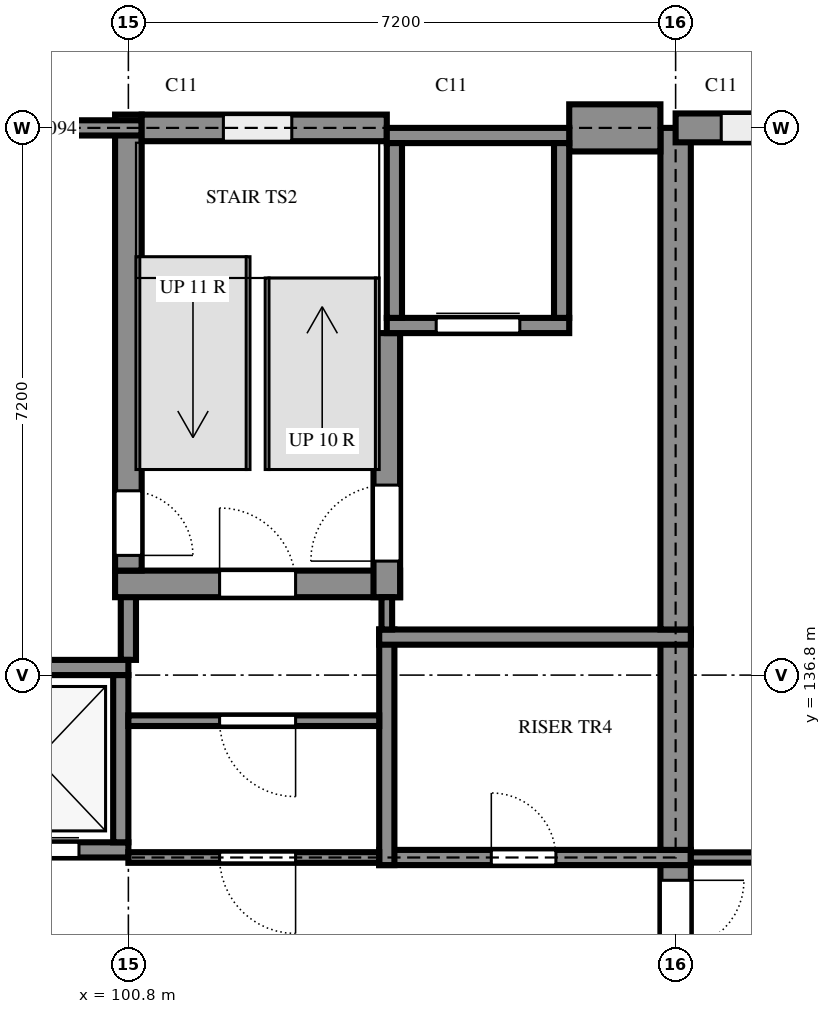
"""IFC4 building model, lengths in metres.
Left out: names, types, materials, properties, quantities, classifications, styles, units other than length and angle.
Written with IfcOpenShell. Run it as: python <this file> out.ifc"""

import sys

from ifc_helpers import new_model, si_unit, direction, frame, frame_2d, origin, origin_2d, place, context, subcontext, project, spatial, rectangle, i_section, extrude, element, fill, save


model = new_model("IFC4")
c1 = context("Model", 3, precision=1e-05, world=origin(), true_north=direction((0.0, 1.0)))
c2 = subcontext(c1, "Body", "Model", "MODEL_VIEW")
j1 = project(units=[si_unit("LENGTHUNIT", "METRE"), si_unit("PLANEANGLEUNIT", "RADIAN")], contexts=[c1])
p1 = place(None, origin())
s1 = spatial("IfcSite", under=j1, at=p1, CompositionType="ELEMENT")
p2 = place(p1, origin())
s2 = spatial("IfcBuilding", under=s1, at=p2, CompositionType="ELEMENT")
p3 = place(p2, frame((0.0, 0.0, 7.2)))
s3 = spatial("IfcBuildingStorey", under=s2, at=p3, CompositionType="ELEMENT", Elevation=7.2)
p4 = place(p3, frame((108.0, 132.0, 0.0), z_axis=(0.0, 0.0, 1.0), x_axis=(0.0, 1.0, 0.0)))
e1 = element("IfcWall", 1, at=p4, inside=s3, PredefinedType="SHEAR", context=c2, shape_type="SweptSolid", body=[
    extrude(rectangle(XDim=2.5, YDim=0.4, at=frame_2d((1.25, 0.0))), origin(), (0.0, 0.0, 1.0), 3.6),
])
p5 = place(p4, frame((0.3, 0.0, 0.0)))
e2 = element("IfcOpeningElement", 2, at=p5, cuts=e1, PredefinedType="OPENING", context=c2, shape_type="SweptSolid", body=[
    extrude(rectangle(XDim=1.8, YDim=2.1, at=frame_2d((0.9, 1.05))), frame((0.0, 0.21, 0.0), z_axis=(0.0, -1.0, 0.0), x_axis=(1.0, 0.0, 0.0)), (0.0, 0.0, 1.0), 0.42),
])
p6 = place(p3, frame((104.1, 134.4, 0.0), z_axis=(0.0, 0.0, 1.0), x_axis=(1.0, 0.0, 0.0)))
e3 = element("IfcWall", 3, at=p6, inside=s3, PredefinedType="SHEAR", context=c2, shape_type="SweptSolid", body=[
    extrude(rectangle(XDim=4.1, YDim=0.2, at=frame_2d((2.05, 0.0))), origin(), (0.0, 0.0, 1.0), 3.6),
])
p7 = place(p6, frame((1.475, 0.0, 0.0)))
e4 = element("IfcOpeningElement", 4, at=p7, cuts=e3, PredefinedType="OPENING", context=c2, shape_type="SweptSolid", body=[
    extrude(rectangle(XDim=0.85, YDim=2.1, at=frame_2d((0.425, 1.05))), frame((0.0, 0.11, 0.0), z_axis=(0.0, -1.0, 0.0), x_axis=(1.0, 0.0, 0.0)), (0.0, 0.0, 1.0), 0.22),
])
p8 = place(p3, frame((108.0, 134.5, 0.0), z_axis=(0.0, 0.0, 1.0), x_axis=(0.0, 1.0, 0.0)))
e5 = element("IfcWall", 5, at=p8, inside=s3, PredefinedType="SHEAR", context=c2, shape_type="SweptSolid", body=[
    extrude(rectangle(XDim=2.9, YDim=0.4, at=frame_2d((1.45, 0.0))), origin(), (0.0, 0.0, 1.0), 3.6),
])
p9 = place(p3, frame((100.8, 137.0, 0.0), z_axis=(0.0, 0.0, 1.0), x_axis=(0.0, 1.0, 0.0)))
e6 = element("IfcWall", 6, at=p9, inside=s3, PredefinedType="SHEAR", context=c2, shape_type="SweptSolid", body=[
    extrude(rectangle(XDim=1.175, YDim=0.2, at=frame_2d((0.587, 0.0))), origin(), (0.0, 0.0, 1.0), 3.6),
])
p10 = place(p3, frame((104.2, 137.4, 0.0), z_axis=(0.0, 0.0, 1.0), x_axis=(0.0, -1.0, 0.0)))
e7 = element("IfcWall", 7, at=p10, inside=s3, PredefinedType="SHEAR", context=c2, shape_type="SweptSolid", body=[
    extrude(rectangle(XDim=3.1, YDim=0.2, at=frame_2d((1.55, 0.0))), origin(), (0.0, 0.0, 1.0), 3.6),
])
p11 = place(p3, frame((108.2, 137.3, 0.0), z_axis=(0.0, 0.0, 1.0), x_axis=(-1.0, 0.0, 0.0)))
e8 = element("IfcWall", 8, at=p11, inside=s3, PredefinedType="SHEAR", context=c2, shape_type="SweptSolid", body=[
    extrude(rectangle(XDim=4.1, YDim=0.2, at=frame_2d((2.05, 0.0))), origin(), (0.0, 0.0, 1.0), 3.6),
])
p12 = place(p3, frame((108.0, 137.4, 0.0), z_axis=(0.0, 0.0, 1.0), x_axis=(0.0, 1.0, 0.0)))
e9 = element("IfcWall", 9, at=p12, inside=s3, PredefinedType="SHEAR", context=c2, shape_type="SweptSolid", body=[
    extrude(rectangle(XDim=6.6, YDim=0.4, at=frame_2d((3.3, 0.0))), origin(), (0.0, 0.0, 1.0), 3.6),
])
p13 = place(p3, frame((100.625, 138.0, 0.0), z_axis=(0.0, 0.0, 1.0), x_axis=(1.0, 0.0, 0.0)))
e10 = element("IfcWall", 10, at=p13, inside=s3, PredefinedType="SHEAR", context=c2, shape_type="SweptSolid", body=[
    extrude(rectangle(XDim=3.75, YDim=0.35, at=frame_2d((1.875, 0.0))), origin(), (0.0, 0.0, 1.0), 3.6),
])
p14 = place(p13, frame((1.375, 0.0, 0.0)))
e11 = element("IfcOpeningElement", 11, at=p14, cuts=e10, PredefinedType="OPENING", context=c2, shape_type="SweptSolid", body=[
    extrude(rectangle(XDim=1.0, YDim=2.1, at=frame_2d((0.5, 1.05))), frame((0.0, 0.185, 0.0), z_axis=(0.0, -1.0, 0.0), x_axis=(1.0, 0.0, 0.0)), (0.0, 0.0, 1.0), 0.37),
])
p15 = place(p3, frame((104.2, 137.825, 0.0), z_axis=(0.0, 0.0, 1.0), x_axis=(0.0, 1.0, 0.0)))
e12 = element("IfcWall", 12, at=p15, inside=s3, PredefinedType="SHEAR", context=c2, shape_type="SweptSolid", body=[
    extrude(rectangle(XDim=3.475, YDim=0.35, at=frame_2d((1.738, 0.0))), origin(), (0.0, 0.0, 1.0), 3.6),
])
p16 = place(p15, frame((0.475, 0.0, 0.0)))
e13 = element("IfcOpeningElement", 13, at=p16, cuts=e12, PredefinedType="OPENING", context=c2, shape_type="SweptSolid", body=[
    extrude(rectangle(XDim=1.0, YDim=2.1, at=frame_2d((0.5, 1.05))), frame((0.0, 0.185, 0.0), z_axis=(0.0, -1.0, 0.0), x_axis=(1.0, 0.0, 0.0)), (0.0, 0.0, 1.0), 0.37),
])
p17 = place(p3, frame((100.8, 144.175, 0.0), z_axis=(0.0, 0.0, 1.0), x_axis=(0.0, -1.0, 0.0)))
e14 = element("IfcWall", 14, at=p17, inside=s3, PredefinedType="SHEAR", context=c2, shape_type="SweptSolid", body=[
    extrude(rectangle(XDim=6.0, YDim=0.35, at=frame_2d((3.0, 0.0))), origin(), (0.0, 0.0, 1.0), 3.6),
])
p18 = place(p17, frame((4.95, 0.0, 0.0)))
e15 = element("IfcOpeningElement", 15, at=p18, cuts=e14, PredefinedType="OPENING", context=c2, shape_type="SweptSolid", body=[
    extrude(rectangle(XDim=0.85, YDim=2.1, at=frame_2d((0.425, 1.05))), frame((0.0, 0.185, 0.0), z_axis=(0.0, -1.0, 0.0), x_axis=(1.0, 0.0, 0.0)), (0.0, 0.0, 1.0), 0.37),
])
p19 = place(p3, frame((100.975, 144.0, 0.0), z_axis=(0.0, 0.0, 1.0), x_axis=(-1.0, 0.0, 0.0)))
e16 = element("IfcWall", 16, at=p19, inside=s3, PredefinedType="SHEAR", context=c2, shape_type="SweptSolid", body=[
    extrude(rectangle(XDim=7.575, YDim=0.2, at=frame_2d((3.788, 0.0))), origin(), (0.0, 0.0, 1.0), 3.6),
])
p20 = place(p3, frame((104.2, 144.0, 0.0), z_axis=(0.0, 0.0, 1.0), x_axis=(-1.0, 0.0, 0.0)))
e17 = element("IfcWall", 17, at=p20, inside=s3, PredefinedType="SHEAR", context=c2, shape_type="SweptSolid", body=[
    extrude(rectangle(XDim=3.225, YDim=0.35, at=frame_2d((1.612, 0.0))), origin(), (0.0, 0.0, 1.0), 3.6),
])
p21 = place(p20, frame((1.25, 0.0, 0.6)))
e18 = element("IfcOpeningElement", 18, at=p21, cuts=e17, PredefinedType="OPENING", context=c2, shape_type="SweptSolid", body=[
    extrude(rectangle(XDim=0.9, YDim=2.1, at=frame_2d((0.45, 1.05))), frame((0.0, 0.185, 0.0), z_axis=(0.0, -1.0, 0.0), x_axis=(1.0, 0.0, 0.0)), (0.0, 0.0, 1.0), 0.37),
])
p22 = place(p3, frame((115.046, 144.0, 0.0), z_axis=(0.0, 0.0, 1.0), x_axis=(-1.0, 0.0, 0.0)))
e19 = element("IfcWall", 19, at=p22, inside=s3, PredefinedType="SOLIDWALL", context=c2, shape_type="SweptSolid", body=[
    extrude(rectangle(XDim=7.046, YDim=0.38, at=frame_2d((3.523, 0.0))), origin(), (0.0, 0.0, 1.0), 3.12),
])
p23 = place(p22, frame((4.046, 0.0, 0.6)))
e20 = element("IfcOpeningElement", 20, at=p23, cuts=e19, PredefinedType="OPENING", context=c2, shape_type="SweptSolid", body=[
    extrude(rectangle(XDim=2.4, YDim=2.4, at=frame_2d((1.2, 1.2))), frame((0.0, 0.2, 0.0), z_axis=(0.0, -1.0, 0.0), x_axis=(1.0, 0.0, 0.0)), (0.0, 0.0, 1.0), 0.4),
])
p24 = place(p22, frame((0.447, 0.0, 0.6)))
e21 = element("IfcOpeningElement", 21, at=p24, cuts=e19, PredefinedType="OPENING", context=c2, shape_type="SweptSolid", body=[
    extrude(rectangle(XDim=2.4, YDim=2.4, at=frame_2d((1.2, 1.2))), frame((0.0, 0.2, 0.0), z_axis=(0.0, -1.0, 0.0), x_axis=(1.0, 0.0, 0.0)), (0.0, 0.0, 1.0), 0.4),
])
p25 = place(p3, frame((107.8, 144.0, 0.0), z_axis=(0.0, 0.0, 1.0), x_axis=(-1.0, 0.0, 0.0)))
e22 = element("IfcWall", 22, at=p25, inside=s3, PredefinedType="SOLIDWALL", context=c2, shape_type="SweptSolid", body=[
    extrude(rectangle(XDim=1.2, YDim=0.62, at=frame_2d((0.6, 0.0))), origin(), (0.0, 0.0, 1.0), 3.42),
])
p26 = place(p3, frame((98.4, 134.5, 0.0), z_axis=(0.0, 0.0, 1.0), x_axis=(1.0, 0.0, 0.0)))
e23 = element("IfcWall", 23, at=p26, inside=s3, PredefinedType="SHEAR", context=c2, shape_type="SweptSolid", body=[
    extrude(rectangle(XDim=2.4, YDim=0.2, at=frame_2d((1.2, 0.0))), origin(), (0.0, 0.0, 1.0), 3.6),
])
p27 = place(p26, frame((0.65, 0.0, 0.0)))
e24 = element("IfcOpeningElement", 24, at=p27, cuts=e23, PredefinedType="OPENING", context=c2, shape_type="SweptSolid", body=[
    extrude(rectangle(XDim=1.1, YDim=2.1, at=frame_2d((0.55, 1.05))), frame((0.0, 0.11, 0.0), z_axis=(0.0, -1.0, 0.0), x_axis=(1.0, 0.0, 0.0)), (0.0, 0.0, 1.0), 0.22),
])
p28 = place(p3, frame((98.4, 136.9, 0.0), z_axis=(0.0, 0.0, 1.0), x_axis=(1.0, 0.0, 0.0)))
e25 = element("IfcWall", 25, at=p28, inside=s3, PredefinedType="SHEAR", context=c2, shape_type="SweptSolid", body=[
    extrude(rectangle(XDim=2.4, YDim=0.2, at=frame_2d((1.2, 0.0))), origin(), (0.0, 0.0, 1.0), 3.6),
])
p29 = place(p3, frame((100.7, 134.6, 0.0), z_axis=(0.0, 0.0, 1.0), x_axis=(0.0, 1.0, 0.0)))
e26 = element("IfcWall", 26, at=p29, inside=s3, PredefinedType="SHEAR", context=c2, shape_type="SweptSolid", body=[
    extrude(rectangle(XDim=2.2, YDim=0.2, at=frame_2d((1.1, 0.0))), origin(), (0.0, 0.0, 1.0), 3.6),
])
p30 = place(p3, frame((104.2, 141.4, 0.0), z_axis=(0.0, 0.0, 1.0), x_axis=(1.0, 0.0, 0.0)))
e27 = element("IfcWall", 27, at=p30, inside=s3, PredefinedType="SHEAR", context=c2, shape_type="SweptSolid", body=[
    extrude(rectangle(XDim=2.4, YDim=0.2, at=frame_2d((1.2, 0.0))), origin(), (0.0, 0.0, 1.0), 3.6),
])
p31 = place(p30, frame((0.65, 0.0, 0.0)))
e28 = element("IfcOpeningElement", 28, at=p31, cuts=e27, PredefinedType="OPENING", context=c2, shape_type="SweptSolid", body=[
    extrude(rectangle(XDim=1.1, YDim=2.1, at=frame_2d((0.55, 1.05))), frame((0.0, 0.11, 0.0), z_axis=(0.0, -1.0, 0.0), x_axis=(1.0, 0.0, 0.0)), (0.0, 0.0, 1.0), 0.22),
])
p32 = place(p3, frame((104.2, 143.9, 0.0), z_axis=(0.0, 0.0, 1.0), x_axis=(1.0, 0.0, 0.0)))
e29 = element("IfcWall", 29, at=p32, inside=s3, PredefinedType="SHEAR", context=c2, shape_type="SweptSolid", body=[
    extrude(rectangle(XDim=2.4, YDim=0.2, at=frame_2d((1.2, 0.0))), origin(), (0.0, 0.0, 1.0), 3.6),
])
for number, where, z_axis, x_axis in (
    (30, (104.3, 141.5, 0.0), (0.0, 0.0, 1.0), (0.0, 1.0, 0.0)),
    (31, (106.5, 141.5, 0.0), (0.0, 0.0, 1.0), (0.0, 1.0, 0.0)),
):
    element("IfcWall", number, at=place(p3, frame(where, z_axis=z_axis, x_axis=x_axis)), inside=s3, PredefinedType="SHEAR", context=c2, shape_type="SweptSolid", body=[
        extrude(rectangle(XDim=2.3, YDim=0.2, at=frame_2d((1.15, 0.0))), origin(), (0.0, 0.0, 1.0), 3.6),
    ])
for number, where, z_axis, x_axis in (
    (32, (101.5, 144.55, 0.0), (0.0, 0.0, 1.0), (1.0, 0.0, 0.0)),
    (33, (105.05, 144.55, 0.0), (0.0, 0.0, 1.0), (1.0, 0.0, 0.0)),
    (34, (108.6, 144.55, 0.0), (0.0, 0.0, 1.0), (1.0, 0.0, 0.0)),
):
    element("IfcColumn", number, at=place(p3, frame(where, z_axis=z_axis, x_axis=x_axis)), inside=s3, PredefinedType="COLUMN", context=c2, shape_type="SweptSolid", body=[
        extrude(i_section(OverallWidth=0.2, OverallDepth=0.2, WebThickness=0.009, FlangeThickness=0.015, FilletRadius=0.018, at=origin_2d()), origin(), (0.0, 0.0, 1.0), 3.6),
    ])
p33 = place(p3, frame((100.8, 134.4, 0.0), z_axis=(0.0, 0.0, 1.0), x_axis=(1.0, 0.0, 0.0)))
e35 = element("IfcWall", 35, at=p33, inside=s3, PredefinedType="PARTITIONING", context=c2, shape_type="SweptSolid", body=[
    extrude(rectangle(XDim=3.3, YDim=0.14, at=frame_2d((1.65, 0.0))), origin(), (0.0, 0.0, 1.0), 3.42),
])
p34 = place(p33, frame((1.2, 0.0, 0.0)))
e36 = element("IfcOpeningElement", 36, at=p34, cuts=e35, PredefinedType="OPENING", context=c2, shape_type="SweptSolid", body=[
    extrude(rectangle(XDim=1.0, YDim=2.1, at=frame_2d((0.5, 1.05))), frame((0.0, 0.08, 0.0), z_axis=(0.0, -1.0, 0.0), x_axis=(1.0, 0.0, 0.0)), (0.0, 0.0, 1.0), 0.16),
])
p35 = place(p3, frame((108.2, 134.4, 0.0), z_axis=(0.0, 0.0, 1.0), x_axis=(1.0, 0.0, 0.0)))
e37 = element("IfcWall", 37, at=p35, inside=s3, PredefinedType="PARTITIONING", context=c2, shape_type="SweptSolid", body=[
    extrude(rectangle(XDim=25.07, YDim=0.135, at=frame_2d((12.535, 0.0))), origin(), (0.0, 0.0, 1.0), 3.12),
])
p36 = place(p35, frame((9.7, 0.0, 0.0)))
e38 = element("IfcOpeningElement", 38, at=p36, cuts=e37, PredefinedType="OPENING", context=c2, shape_type="SweptSolid", body=[
    extrude(rectangle(XDim=1.8, YDim=2.1, at=frame_2d((0.9, 1.05))), frame((0.0, 0.077, 0.0), z_axis=(0.0, -1.0, 0.0), x_axis=(1.0, 0.0, 0.0)), (0.0, 0.0, 1.0), 0.155),
])
p37 = place(p35, frame((16.9, 0.0, 0.0)))
e39 = element("IfcOpeningElement", 39, at=p37, cuts=e37, PredefinedType="OPENING", context=c2, shape_type="SweptSolid", body=[
    extrude(rectangle(XDim=1.8, YDim=2.1, at=frame_2d((0.9, 1.05))), frame((0.0, 0.077, 0.0), z_axis=(0.0, -1.0, 0.0), x_axis=(1.0, 0.0, 0.0)), (0.0, 0.0, 1.0), 0.155),
])
p38 = place(p3, frame((100.8, 136.2, 0.0), z_axis=(0.0, 0.0, 1.0), x_axis=(1.0, 0.0, 0.0)))
e40 = element("IfcWall", 40, at=p38, inside=s3, PredefinedType="PARTITIONING", context=c2, shape_type="SweptSolid", body=[
    extrude(rectangle(XDim=3.3, YDim=0.14, at=frame_2d((1.65, 0.0))), origin(), (0.0, 0.0, 1.0), 3.42),
])
p39 = place(p38, frame((1.2, 0.0, 0.0)))
e41 = element("IfcOpeningElement", 41, at=p39, cuts=e40, PredefinedType="OPENING", context=c2, shape_type="SweptSolid", body=[
    extrude(rectangle(XDim=1.0, YDim=2.1, at=frame_2d((0.5, 1.05))), frame((0.0, 0.08, 0.0), z_axis=(0.0, -1.0, 0.0), x_axis=(1.0, 0.0, 0.0)), (0.0, 0.0, 1.0), 0.16),
])
p40 = place(p3, frame((104.2, 137.4, 0.0), z_axis=(0.0, 0.0, 1.0), x_axis=(0.0, 1.0, 0.0)))
e42 = element("IfcWall", 42, at=p40, inside=s3, PredefinedType="PARTITIONING", context=c2, shape_type="SweptSolid", body=[
    extrude(rectangle(XDim=0.425, YDim=0.14, at=frame_2d((0.212, 0.0))), origin(), (0.0, 0.0, 1.0), 3.42),
])
p41 = place(p23, origin())
e43 = element("IfcWindow", 43, at=p41, inside=s3, PartitioningType="SINGLE_PANEL", PredefinedType="WINDOW", context=c2, shape_type="SweptSolid", body=[
    extrude(rectangle(XDim=2.4, YDim=2.4, at=frame_2d((1.2, 1.2))), frame((0.0, 0.03, 0.0), z_axis=(0.0, -1.0, 0.0), x_axis=(1.0, 0.0, 0.0)), (0.0, 0.0, 1.0), 0.06),
])
fill(e20, e43)
p42 = place(p21, origin())
e44 = element("IfcWindow", 44, at=p42, inside=s3, PartitioningType="SINGLE_PANEL", PredefinedType="WINDOW", context=c2, shape_type="SweptSolid", body=[
    extrude(rectangle(XDim=0.9, YDim=2.1, at=frame_2d((0.45, 1.05))), frame((0.0, 0.03, 0.0), z_axis=(0.0, -1.0, 0.0), x_axis=(1.0, 0.0, 0.0)), (0.0, 0.0, 1.0), 0.06),
])
fill(e18, e44)
p43 = place(p27, origin())
e45 = element("IfcDoor", 45, at=p43, inside=s3, OperationType="SLIDING_TO_LEFT", PredefinedType="DOOR", context=c2, shape_type="SweptSolid", body=[
    extrude(rectangle(XDim=1.1, YDim=2.1, at=frame_2d((0.55, 1.05))), frame((0.0, 0.025, 0.0), z_axis=(0.0, -1.0, 0.0), x_axis=(1.0, 0.0, 0.0)), (0.0, 0.0, 1.0), 0.05),
])
fill(e24, e45)
p44 = place(p31, origin())
e46 = element("IfcDoor", 46, at=p44, inside=s3, OperationType="SLIDING_TO_LEFT", PredefinedType="DOOR", context=c2, shape_type="SweptSolid", body=[
    extrude(rectangle(XDim=1.1, YDim=2.1, at=frame_2d((0.55, 1.05))), frame((0.0, 0.025, 0.0), z_axis=(0.0, -1.0, 0.0), x_axis=(1.0, 0.0, 0.0)), (0.0, 0.0, 1.0), 0.05),
])
fill(e28, e46)
p45 = place(p34, frame((1.0, 0.0, 0.0), z_axis=(0.0, 0.0, 1.0), x_axis=(-1.0, 0.0, 0.0)))
e47 = element("IfcDoor", 47, at=p45, inside=s3, OperationType="SINGLE_SWING_RIGHT", PredefinedType="DOOR", context=c2, shape_type="SweptSolid", body=[
    extrude(rectangle(XDim=1.0, YDim=2.1, at=frame_2d((0.5, 1.05))), frame((0.0, 0.025, 0.0), z_axis=(0.0, -1.0, 0.0), x_axis=(1.0, 0.0, 0.0)), (0.0, 0.0, 1.0), 0.05),
])
fill(e36, e47)
p46 = place(p39, frame((1.0, 0.0, 0.0), z_axis=(0.0, 0.0, 1.0), x_axis=(-1.0, 0.0, 0.0)))
e48 = element("IfcDoor", 48, at=p46, inside=s3, OperationType="SINGLE_SWING_RIGHT", PredefinedType="DOOR", context=c2, shape_type="SweptSolid", body=[
    extrude(rectangle(XDim=1.0, YDim=2.1, at=frame_2d((0.5, 1.05))), frame((0.0, 0.025, 0.0), z_axis=(0.0, -1.0, 0.0), x_axis=(1.0, 0.0, 0.0)), (0.0, 0.0, 1.0), 0.05),
])
fill(e41, e48)
p47 = place(p7, origin())
e49 = element("IfcDoor", 49, at=p47, inside=s3, OperationType="SINGLE_SWING_RIGHT", PredefinedType="DOOR", context=c2, shape_type="SweptSolid", body=[
    extrude(rectangle(XDim=0.85, YDim=2.1, at=frame_2d((0.425, 1.05))), frame((0.0, 0.025, 0.0), z_axis=(0.0, -1.0, 0.0), x_axis=(1.0, 0.0, 0.0)), (0.0, 0.0, 1.0), 0.05),
])
fill(e4, e49)
p48 = place(p14, origin())
e50 = element("IfcDoor", 50, at=p48, inside=s3, OperationType="SINGLE_SWING_RIGHT", PredefinedType="DOOR", context=c2, shape_type="SweptSolid", body=[
    extrude(rectangle(XDim=1.0, YDim=2.1, at=frame_2d((0.5, 1.05))), frame((0.0, 0.025, 0.0), z_axis=(0.0, -1.0, 0.0), x_axis=(1.0, 0.0, 0.0)), (0.0, 0.0, 1.0), 0.05),
])
fill(e11, e50)
p49 = place(p18, origin())
e51 = element("IfcDoor", 51, at=p49, inside=s3, OperationType="SINGLE_SWING_LEFT", PredefinedType="DOOR", context=c2, shape_type="SweptSolid", body=[
    extrude(rectangle(XDim=0.85, YDim=2.1, at=frame_2d((0.425, 1.05))), frame((0.0, 0.025, 0.0), z_axis=(0.0, -1.0, 0.0), x_axis=(1.0, 0.0, 0.0)), (0.0, 0.0, 1.0), 0.05),
])
fill(e15, e51)
p50 = place(p16, origin())
e52 = element("IfcDoor", 52, at=p50, inside=s3, OperationType="SINGLE_SWING_RIGHT", PredefinedType="DOOR", context=c2, shape_type="SweptSolid", body=[
    extrude(rectangle(XDim=1.0, YDim=2.1, at=frame_2d((0.5, 1.05))), frame((0.0, 0.025, 0.0), z_axis=(0.0, -1.0, 0.0), x_axis=(1.0, 0.0, 0.0)), (0.0, 0.0, 1.0), 0.05),
])
fill(e13, e52)
p51 = place(p5, frame((1.8, 0.0, 0.0), z_axis=(0.0, 0.0, 1.0), x_axis=(-1.0, 0.0, 0.0)))
e53 = element("IfcDoor", 53, at=p51, inside=s3, OperationType="DOUBLE_DOOR_SINGLE_SWING", PredefinedType="DOOR", context=c2, shape_type="SweptSolid", body=[
    extrude(rectangle(XDim=1.8, YDim=2.1, at=frame_2d((0.9, 1.05))), frame((0.0, 0.025, 0.0), z_axis=(0.0, -1.0, 0.0), x_axis=(1.0, 0.0, 0.0)), (0.0, 0.0, 1.0), 0.05),
])
fill(e2, e53)
save(model, sys.argv[1])
